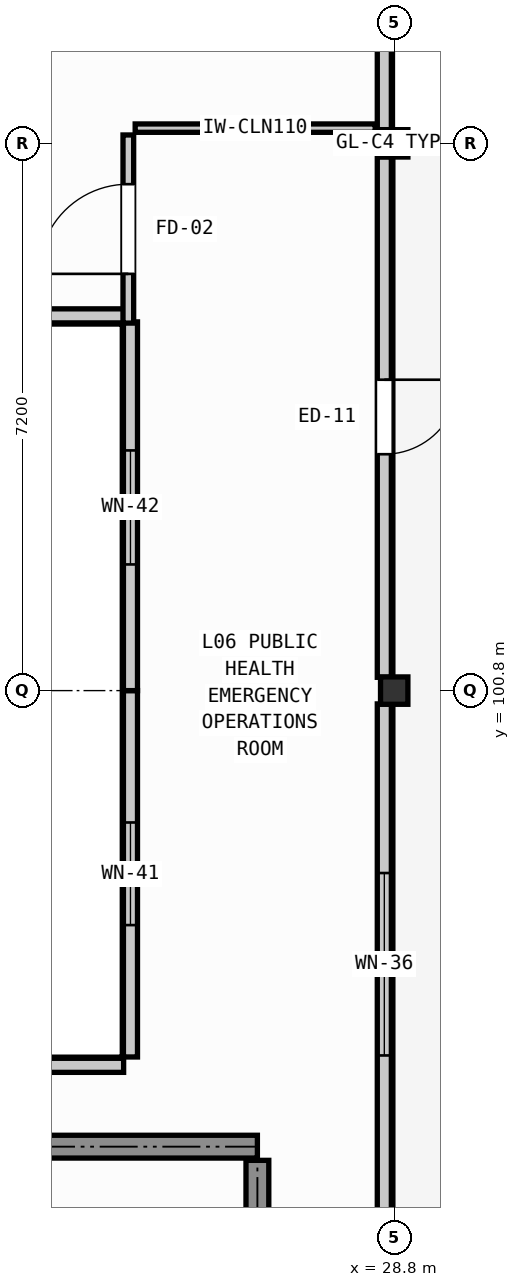
"""IFC4 building model, lengths in metres.
Left out: names, types, materials, properties, quantities, classifications, styles, units other than length and angle.
Written with IfcOpenShell. Run it as: python <this file> out.ifc"""

import sys

from ifc_helpers import new_model, si_unit, direction, frame, frame_2d, origin, origin_2d, place, context, subcontext, project, spatial, rectangle, extrude, element, fill, save


model = new_model("IFC4")
c1 = context("Model", 3, precision=1e-05, world=origin(), true_north=direction((0.0, 1.0)))
c2 = subcontext(c1, "Body", "Model", "MODEL_VIEW")
j1 = project(units=[si_unit("LENGTHUNIT", "METRE"), si_unit("PLANEANGLEUNIT", "RADIAN")], contexts=[c1])
p1 = place(None, origin())
s1 = spatial("IfcSite", under=j1, at=p1, CompositionType="ELEMENT")
p2 = place(p1, origin())
s2 = spatial("IfcBuilding", under=s1, at=p2, CompositionType="ELEMENT")
p3 = place(p2, frame((0.0, 0.0, 21.6)))
s3 = spatial("IfcBuildingStorey", under=s2, at=p3, CompositionType="ELEMENT", Elevation=21.6)
for number, where, z_axis, x_axis in (
    (1, (28.8, 100.8, 0.0), (0.0, 0.0, 1.0), (1.0, 0.0, 0.0)),
    (2, (28.8, 108.0, 0.0), (0.0, 0.0, 1.0), (1.0, 0.0, 0.0)),
):
    element("IfcColumn", number, at=place(p3, frame(where, z_axis=z_axis, x_axis=x_axis)), inside=s3, PredefinedType="COLUMN", context=c2, shape_type="SweptSolid", body=[
        extrude(rectangle(XDim=0.36, YDim=0.36, at=origin_2d()), origin(), (0.0, 0.0, 1.0), 3.69),
    ])
p4 = place(p3, frame((28.67, 115.025, 0.0), z_axis=(0.0, 0.0, 1.0), x_axis=(0.0, -1.0, 0.0)))
e3 = element("IfcWall", 3, at=p4, inside=s3, PredefinedType="SOLIDWALL", context=c2, shape_type="SweptSolid", body=[
    extrude(rectangle(XDim=6.85, YDim=0.185, at=frame_2d((3.425, 0.0))), origin(), (0.0, 0.0, 1.0), 3.05),
])
p5 = place(p4, frame((2.3, 0.0, 0.95)))
e4 = element("IfcOpeningElement", 4, at=p5, cuts=e3, PredefinedType="OPENING", context=c2, shape_type="SweptSolid", body=[
    extrude(rectangle(XDim=2.25, YDim=1.25, at=frame_2d((1.125, 0.625))), frame((0.0, 0.103, 0.0), z_axis=(0.0, -1.0, 0.0), x_axis=(1.0, 0.0, 0.0)), (0.0, 0.0, 1.0), 0.205),
])
p6 = place(p3, frame((28.67, 107.825, 0.0), z_axis=(0.0, 0.0, 1.0), x_axis=(0.0, -1.0, 0.0)))
e5 = element("IfcWall", 5, at=p6, inside=s3, PredefinedType="SOLIDWALL", context=c2, shape_type="SweptSolid", body=[
    extrude(rectangle(XDim=6.85, YDim=0.185, at=frame_2d((3.425, 0.0))), origin(), (0.0, 0.0, 1.0), 3.05),
])
p7 = place(p6, frame((2.935, 0.0, 0.0)))
e6 = element("IfcOpeningElement", 6, at=p7, cuts=e5, PredefinedType="OPENING", context=c2, shape_type="SweptSolid", body=[
    extrude(rectangle(XDim=0.98, YDim=2.15, at=frame_2d((0.49, 1.075))), frame((0.0, 0.103, 0.0), z_axis=(0.0, -1.0, 0.0), x_axis=(1.0, 0.0, 0.0)), (0.0, 0.0, 1.0), 0.205),
])
p8 = place(p3, frame((28.67, 100.625, 0.0), z_axis=(0.0, 0.0, 1.0), x_axis=(0.0, -1.0, 0.0)))
e7 = element("IfcWall", 7, at=p8, inside=s3, PredefinedType="SOLIDWALL", context=c2, shape_type="SweptSolid", body=[
    extrude(rectangle(XDim=6.85, YDim=0.185, at=frame_2d((3.425, 0.0))), origin(), (0.0, 0.0, 1.0), 3.13),
])
p9 = place(p8, frame((2.225, 0.0, 0.95)))
e8 = element("IfcOpeningElement", 8, at=p9, cuts=e7, PredefinedType="OPENING", context=c2, shape_type="SweptSolid", body=[
    extrude(rectangle(XDim=2.4, YDim=1.25, at=frame_2d((1.2, 0.625))), frame((0.0, 0.103, 0.0), z_axis=(0.0, -1.0, 0.0), x_axis=(1.0, 0.0, 0.0)), (0.0, 0.0, 1.0), 0.205),
])
p10 = place(p3, frame((21.6, 95.87, 0.0), z_axis=(0.0, 0.0, 1.0), x_axis=(1.0, 0.0, 0.0)))
e9 = element("IfcWall", 9, at=p10, inside=s3, PredefinedType="SOLIDWALL", context=c2, shape_type="SweptSolid", body=[
    extrude(rectangle(XDim=3.64, YDim=0.185, at=frame_2d((1.82, 0.0))), origin(), (0.0, 0.0, 1.0), 3.67),
])
p11 = place(p3, frame((25.33, 95.98, 0.0), z_axis=(0.0, 0.0, 1.0), x_axis=(0.0, 1.0, 0.0)))
e10 = element("IfcWall", 10, at=p11, inside=s3, PredefinedType="SOLIDWALL", context=c2, shape_type="SweptSolid", body=[
    extrude(rectangle(XDim=4.82, YDim=0.185, at=frame_2d((2.41, 0.0))), origin(), (0.0, 0.0, 1.0), 3.67),
])
p12 = place(p11, frame((1.735, 0.0, 0.95)))
e11 = element("IfcOpeningElement", 11, at=p12, cuts=e10, PredefinedType="OPENING", context=c2, shape_type="SweptSolid", body=[
    extrude(rectangle(XDim=1.35, YDim=1.55, at=frame_2d((0.675, 0.775))), frame((0.0, 0.103, 0.0), z_axis=(0.0, -1.0, 0.0), x_axis=(1.0, 0.0, 0.0)), (0.0, 0.0, 1.0), 0.205),
])
p13 = place(p3, frame((25.33, 100.8, 0.0), z_axis=(0.0, 0.0, 1.0), x_axis=(0.0, 1.0, 0.0)))
e12 = element("IfcWall", 12, at=p13, inside=s3, PredefinedType="SOLIDWALL", context=c2, shape_type="SweptSolid", body=[
    extrude(rectangle(XDim=4.851, YDim=0.185, at=frame_2d((2.425, 0.0))), origin(), (0.0, 0.0, 1.0), 3.67),
])
p14 = place(p13, frame((1.66, 0.0, 0.95)))
e13 = element("IfcOpeningElement", 13, at=p14, cuts=e12, PredefinedType="OPENING", context=c2, shape_type="SweptSolid", body=[
    extrude(rectangle(XDim=1.5, YDim=1.55, at=frame_2d((0.75, 0.775))), frame((0.0, 0.103, 0.0), z_axis=(0.0, -1.0, 0.0), x_axis=(1.0, 0.0, 0.0)), (0.0, 0.0, 1.0), 0.205),
])
p15 = place(p3, frame((25.24, 105.73, 0.0), z_axis=(0.0, 0.0, 1.0), x_axis=(-1.0, 0.0, 0.0)))
e14 = element("IfcWall", 14, at=p15, inside=s3, PredefinedType="SOLIDWALL", context=c2, shape_type="SweptSolid", body=[
    extrude(rectangle(XDim=3.64, YDim=0.185, at=frame_2d((1.82, 0.0))), origin(), (0.0, 0.0, 1.0), 3.67),
])
p16 = place(p15, frame((0.995, 0.0, 0.95)))
e15 = element("IfcOpeningElement", 15, at=p16, cuts=e14, PredefinedType="OPENING", context=c2, shape_type="SweptSolid", body=[
    extrude(rectangle(XDim=1.65, YDim=1.55, at=frame_2d((0.825, 0.775))), frame((0.0, 0.103, 0.0), z_axis=(0.0, -1.0, 0.0), x_axis=(1.0, 0.0, 0.0)), (0.0, 0.0, 1.0), 0.205),
])
p17 = place(p3, frame((16.2, 94.8, 0.0), z_axis=(0.0, 0.0, 1.0), x_axis=(1.0, 0.0, 0.0)))
e16 = element("IfcWall", 16, at=p17, inside=s3, PredefinedType="SHEAR", context=c2, shape_type="SweptSolid", body=[
    extrude(rectangle(XDim=10.8, YDim=0.3, at=frame_2d((5.4, 0.0))), origin(), (0.0, 0.0, 1.0), 3.685),
])
p18 = place(p3, frame((27.0, 88.38, 0.0), z_axis=(0.0, 0.0, 1.0), x_axis=(0.0, 1.0, 0.0)))
e17 = element("IfcWall", 17, at=p18, inside=s3, PredefinedType="SHEAR", context=c2, shape_type="SweptSolid", body=[
    extrude(rectangle(XDim=6.24, YDim=0.3, at=frame_2d((3.12, 0.0))), origin(), (0.0, 0.0, 1.0), 3.685),
])
p19 = place(p3, frame((25.302, 105.635, 0.0), z_axis=(0.0, 0.0, 1.0), x_axis=(0.0, 1.0, 0.0)))
e18 = element("IfcWall", 18, at=p19, inside=s3, PredefinedType="PARTITIONING", context=c2, shape_type="SweptSolid", body=[
    extrude(rectangle(XDim=2.475, YDim=0.14, at=frame_2d((1.238, 0.0))), origin(), (0.0, 0.0, 1.0), 3.05),
])
p20 = place(p19, frame((0.647, 0.0, 0.0)))
e19 = element("IfcOpeningElement", 19, at=p20, cuts=e18, PredefinedType="OPENING", context=c2, shape_type="SweptSolid", body=[
    extrude(rectangle(XDim=1.18, YDim=2.16, at=frame_2d((0.59, 1.08))), frame((0.0, 0.08, 0.0), z_axis=(0.0, -1.0, 0.0), x_axis=(1.0, 0.0, 0.0)), (0.0, 0.0, 1.0), 0.16),
])
p21 = place(p3, frame((25.392, 108.2, 0.0), z_axis=(0.0, 0.0, 1.0), x_axis=(1.0, 0.0, 0.0)))
e20 = element("IfcWall", 20, at=p21, inside=s3, PredefinedType="PARTITIONING", context=c2, shape_type="SweptSolid", body=[
    extrude(rectangle(XDim=3.158, YDim=0.11, at=frame_2d((1.579, 0.0))), origin(), (0.0, 0.0, 1.0), 3.05),
])
p22 = place(p7, origin())
e21 = element("IfcDoor", 21, at=p22, inside=s3, OperationType="SINGLE_SWING_RIGHT", PredefinedType="DOOR", context=c2, shape_type="SweptSolid", body=[
    extrude(rectangle(XDim=0.98, YDim=2.15, at=frame_2d((0.49, 1.075))), frame((0.0, 0.025, 0.0), z_axis=(0.0, -1.0, 0.0), x_axis=(1.0, 0.0, 0.0)), (0.0, 0.0, 1.0), 0.05),
])
fill(e6, e21)
p23 = place(p9, origin())
e22 = element("IfcWindow", 22, at=p23, inside=s3, PartitioningType="SINGLE_PANEL", PredefinedType="WINDOW", context=c2, shape_type="SweptSolid", body=[
    extrude(rectangle(XDim=2.4, YDim=1.25, at=frame_2d((1.2, 0.625))), frame((0.0, 0.03, 0.0), z_axis=(0.0, -1.0, 0.0), x_axis=(1.0, 0.0, 0.0)), (0.0, 0.0, 1.0), 0.06),
])
fill(e8, e22)
p24 = place(p12, origin())
e23 = element("IfcWindow", 23, at=p24, inside=s3, PartitioningType="SINGLE_PANEL", PredefinedType="WINDOW", context=c2, shape_type="SweptSolid", body=[
    extrude(rectangle(XDim=1.35, YDim=1.55, at=frame_2d((0.675, 0.775))), frame((0.0, 0.03, 0.0), z_axis=(0.0, -1.0, 0.0), x_axis=(1.0, 0.0, 0.0)), (0.0, 0.0, 1.0), 0.06),
])
fill(e11, e23)
p25 = place(p14, origin())
e24 = element("IfcWindow", 24, at=p25, inside=s3, PartitioningType="SINGLE_PANEL", PredefinedType="WINDOW", context=c2, shape_type="SweptSolid", body=[
    extrude(rectangle(XDim=1.5, YDim=1.55, at=frame_2d((0.75, 0.775))), frame((0.0, 0.03, 0.0), z_axis=(0.0, -1.0, 0.0), x_axis=(1.0, 0.0, 0.0)), (0.0, 0.0, 1.0), 0.06),
])
fill(e13, e24)
p26 = place(p20, origin())
e25 = element("IfcDoor", 25, at=p26, inside=s3, OperationType="SINGLE_SWING_LEFT", PredefinedType="DOOR", context=c2, shape_type="SweptSolid", body=[
    extrude(rectangle(XDim=1.18, YDim=2.16, at=frame_2d((0.59, 1.08))), frame((0.0, 0.025, 0.0), z_axis=(0.0, -1.0, 0.0), x_axis=(1.0, 0.0, 0.0)), (0.0, 0.0, 1.0), 0.05),
])
fill(e19, e25)
save(model, sys.argv[1])
